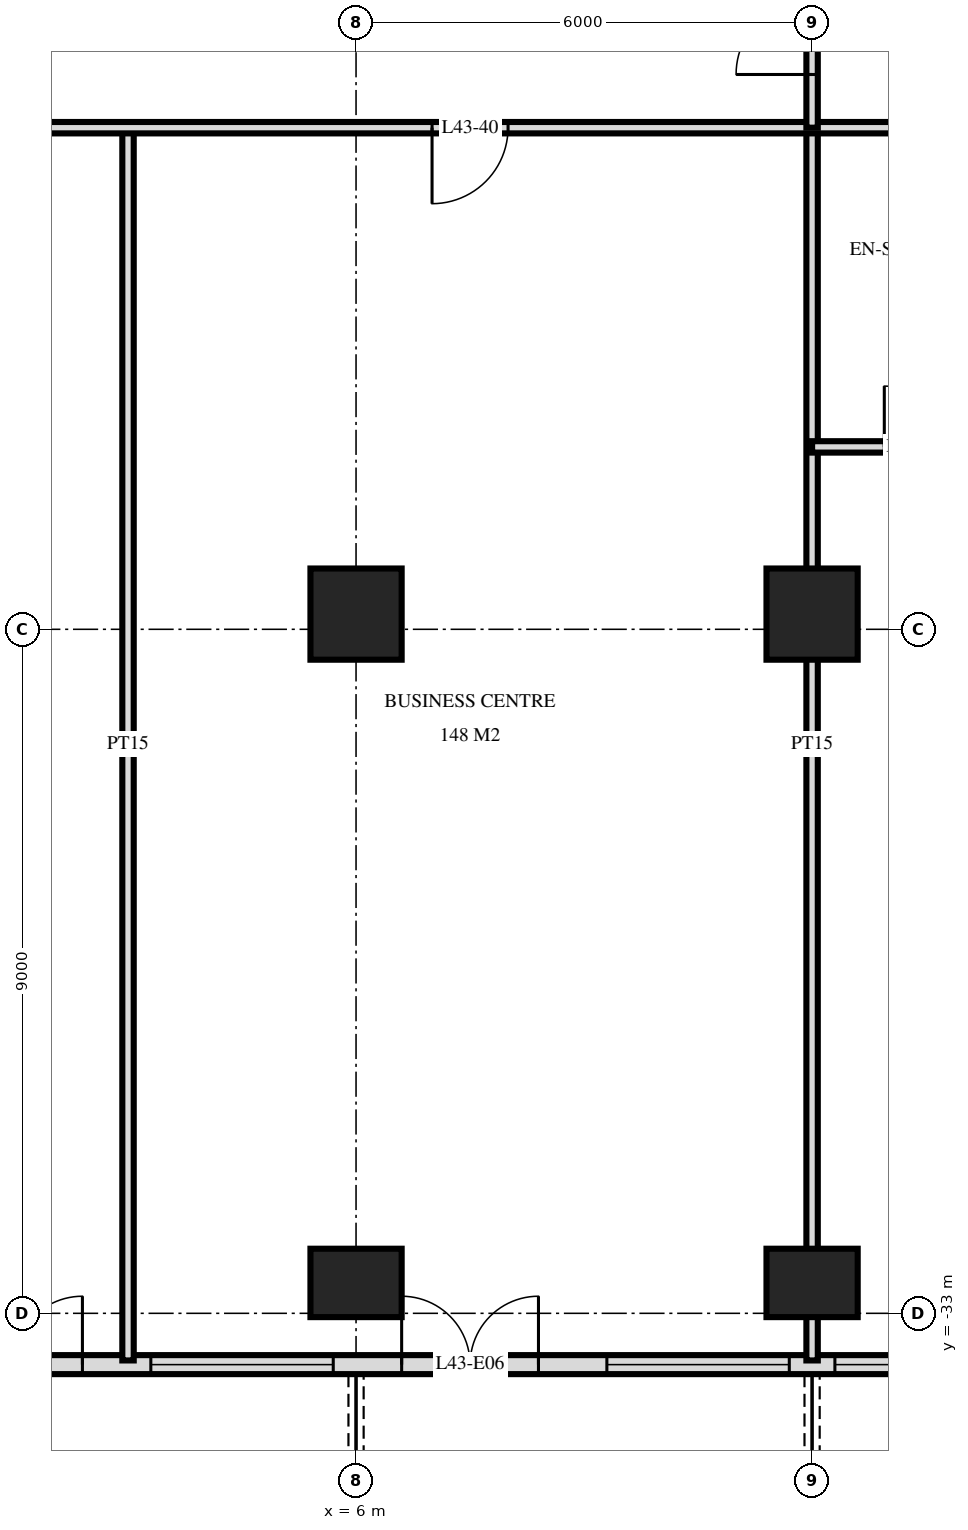
"""IFC4 building model, lengths in metres.
Left out: names, types, materials, properties, quantities, classifications, styles, units other than length and angle.
Written with IfcOpenShell. Run it as: python <this file> out.ifc"""

import sys

from ifc_helpers import new_model, si_unit, direction, frame, frame_2d, origin, origin_2d, place, context, subcontext, project, spatial, rectangle, extrude, element, fill, save


model = new_model("IFC4")
c1 = context("Model", 3, precision=1e-05, world=origin(), true_north=direction((0.0, 1.0)))
c2 = subcontext(c1, "Body", "Model", "MODEL_VIEW")
j1 = project(units=[si_unit("LENGTHUNIT", "METRE"), si_unit("PLANEANGLEUNIT", "RADIAN")], contexts=[c1])
p1 = place(None, origin())
s1 = spatial("IfcSite", under=j1, at=p1, CompositionType="ELEMENT")
p2 = place(p1, origin())
s2 = spatial("IfcBuilding", under=s1, at=p2, CompositionType="ELEMENT")
p3 = place(p2, frame((0.0, 0.0, 166.8)))
s3 = spatial("IfcBuildingStorey", under=s2, at=p3, CompositionType="ELEMENT", Elevation=166.8)
p4 = place(p3, frame((6.0, -32.6, 0.0), z_axis=(0.0, 0.0, 1.0), x_axis=(1.0, 0.0, 0.0)))
e1 = element("IfcColumn", 1, at=p4, inside=s3, PredefinedType="COLUMN", context=c2, shape_type="SweptSolid", body=[
    extrude(rectangle(XDim=1.2, YDim=0.9, at=origin_2d()), origin(), (0.0, 0.0, 1.0), 3.6),
])
p5 = place(p3, frame((6.0, -23.8, 0.0), z_axis=(0.0, 0.0, 1.0), x_axis=(1.0, 0.0, 0.0)))
e2 = element("IfcColumn", 2, at=p5, inside=s3, PredefinedType="COLUMN", context=c2, shape_type="SweptSolid", body=[
    extrude(rectangle(XDim=1.2, YDim=1.2, at=origin_2d()), origin(), (0.0, 0.0, 1.0), 3.6),
])
p6 = place(p3, frame((12.0, -32.6, 0.0), z_axis=(0.0, 0.0, 1.0), x_axis=(1.0, 0.0, 0.0)))
e3 = element("IfcColumn", 3, at=p6, inside=s3, PredefinedType="COLUMN", context=c2, shape_type="SweptSolid", body=[
    extrude(rectangle(XDim=1.2, YDim=0.9, at=origin_2d()), origin(), (0.0, 0.0, 1.0), 3.6),
])
p7 = place(p3, frame((12.0, -23.8, 0.0), z_axis=(0.0, 0.0, 1.0), x_axis=(1.0, 0.0, 0.0)))
e4 = element("IfcColumn", 4, at=p7, inside=s3, PredefinedType="COLUMN", context=c2, shape_type="SweptSolid", body=[
    extrude(rectangle(XDim=1.2, YDim=1.2, at=origin_2d()), origin(), (0.0, 0.0, 1.0), 3.6),
])
p8 = place(p3, frame((-23.675, -33.675, 0.0), z_axis=(0.0, 0.0, 1.0), x_axis=(1.0, 0.0, 0.0)))
e5 = element("IfcWall", 5, at=p8, inside=s3, PredefinedType="SOLIDWALL", context=c2, shape_type="SweptSolid", body=[
    extrude(rectangle(XDim=47.351, YDim=0.25, at=frame_2d((23.675, 0.0))), origin(), (0.0, 0.0, 1.0), 3.32),
])
p9 = place(p8, frame((0.575, 0.0, 0.0)))
e6 = element("IfcOpeningElement", 6, at=p9, cuts=e5, PredefinedType="OPENING", context=c2, shape_type="SweptSolid", body=[
    extrude(rectangle(XDim=1.8, YDim=2.4, at=frame_2d((0.9, 1.2))), frame((0.0, 0.135, 0.0), z_axis=(0.0, -1.0, 0.0), x_axis=(1.0, 0.0, 0.0)), (0.0, 0.0, 1.0), 0.27),
])
p10 = place(p8, frame((3.425, 0.0, 0.3)))
e7 = element("IfcOpeningElement", 7, at=p10, cuts=e5, PredefinedType="OPENING", context=c2, shape_type="SweptSolid", body=[
    extrude(rectangle(XDim=1.8, YDim=2.1, at=frame_2d((0.9, 1.05))), frame((0.0, 0.135, 0.0), z_axis=(0.0, -1.0, 0.0), x_axis=(1.0, 0.0, 0.0)), (0.0, 0.0, 1.0), 0.27),
])
p11 = place(p8, frame((5.975, 0.0, 0.3)))
e8 = element("IfcOpeningElement", 8, at=p11, cuts=e5, PredefinedType="OPENING", context=c2, shape_type="SweptSolid", body=[
    extrude(rectangle(XDim=2.4, YDim=2.1, at=frame_2d((1.2, 1.05))), frame((0.0, 0.135, 0.0), z_axis=(0.0, -1.0, 0.0), x_axis=(1.0, 0.0, 0.0)), (0.0, 0.0, 1.0), 0.27),
])
p12 = place(p8, frame((9.275, 0.0, 0.0)))
e9 = element("IfcOpeningElement", 9, at=p12, cuts=e5, PredefinedType="OPENING", context=c2, shape_type="SweptSolid", body=[
    extrude(rectangle(XDim=1.8, YDim=2.4, at=frame_2d((0.9, 1.2))), frame((0.0, 0.135, 0.0), z_axis=(0.0, -1.0, 0.0), x_axis=(1.0, 0.0, 0.0)), (0.0, 0.0, 1.0), 0.27),
])
p13 = place(p8, frame((12.275, 0.0, 0.0)))
e10 = element("IfcOpeningElement", 10, at=p13, cuts=e5, PredefinedType="OPENING", context=c2, shape_type="SweptSolid", body=[
    extrude(rectangle(XDim=1.8, YDim=2.4, at=frame_2d((0.9, 1.2))), frame((0.0, 0.135, 0.0), z_axis=(0.0, -1.0, 0.0), x_axis=(1.0, 0.0, 0.0)), (0.0, 0.0, 1.0), 0.27),
])
p14 = place(p8, frame((14.975, 0.0, 0.3)))
e11 = element("IfcOpeningElement", 11, at=p14, cuts=e5, PredefinedType="OPENING", context=c2, shape_type="SweptSolid", body=[
    extrude(rectangle(XDim=2.4, YDim=2.1, at=frame_2d((1.2, 1.05))), frame((0.0, 0.135, 0.0), z_axis=(0.0, -1.0, 0.0), x_axis=(1.0, 0.0, 0.0)), (0.0, 0.0, 1.0), 0.27),
])
p15 = place(p8, frame((17.975, 0.0, 0.3)))
e12 = element("IfcOpeningElement", 12, at=p15, cuts=e5, PredefinedType="OPENING", context=c2, shape_type="SweptSolid", body=[
    extrude(rectangle(XDim=2.4, YDim=2.1, at=frame_2d((1.2, 1.05))), frame((0.0, 0.135, 0.0), z_axis=(0.0, -1.0, 0.0), x_axis=(1.0, 0.0, 0.0)), (0.0, 0.0, 1.0), 0.27),
])
p16 = place(p8, frame((21.275, 0.0, 0.0)))
e13 = element("IfcOpeningElement", 13, at=p16, cuts=e5, PredefinedType="OPENING", context=c2, shape_type="SweptSolid", body=[
    extrude(rectangle(XDim=1.8, YDim=2.4, at=frame_2d((0.9, 1.2))), frame((0.0, 0.135, 0.0), z_axis=(0.0, -1.0, 0.0), x_axis=(1.0, 0.0, 0.0)), (0.0, 0.0, 1.0), 0.27),
])
p17 = place(p8, frame((24.275, 0.0, 0.0)))
e14 = element("IfcOpeningElement", 14, at=p17, cuts=e5, PredefinedType="OPENING", context=c2, shape_type="SweptSolid", body=[
    extrude(rectangle(XDim=1.8, YDim=2.4, at=frame_2d((0.9, 1.2))), frame((0.0, 0.135, 0.0), z_axis=(0.0, -1.0, 0.0), x_axis=(1.0, 0.0, 0.0)), (0.0, 0.0, 1.0), 0.27),
])
p18 = place(p8, frame((26.975, 0.0, 0.3)))
e15 = element("IfcOpeningElement", 15, at=p18, cuts=e5, PredefinedType="OPENING", context=c2, shape_type="SweptSolid", body=[
    extrude(rectangle(XDim=2.4, YDim=2.1, at=frame_2d((1.2, 1.05))), frame((0.0, 0.135, 0.0), z_axis=(0.0, -1.0, 0.0), x_axis=(1.0, 0.0, 0.0)), (0.0, 0.0, 1.0), 0.27),
])
p19 = place(p8, frame((30.275, 0.0, 0.0)))
e16 = element("IfcOpeningElement", 16, at=p19, cuts=e5, PredefinedType="OPENING", context=c2, shape_type="SweptSolid", body=[
    extrude(rectangle(XDim=1.8, YDim=2.4, at=frame_2d((0.9, 1.2))), frame((0.0, 0.135, 0.0), z_axis=(0.0, -1.0, 0.0), x_axis=(1.0, 0.0, 0.0)), (0.0, 0.0, 1.0), 0.27),
])
p20 = place(p8, frame((32.975, 0.0, 0.3)))
e17 = element("IfcOpeningElement", 17, at=p20, cuts=e5, PredefinedType="OPENING", context=c2, shape_type="SweptSolid", body=[
    extrude(rectangle(XDim=2.4, YDim=2.1, at=frame_2d((1.2, 1.05))), frame((0.0, 0.135, 0.0), z_axis=(0.0, -1.0, 0.0), x_axis=(1.0, 0.0, 0.0)), (0.0, 0.0, 1.0), 0.27),
])
p21 = place(p8, frame((35.975, 0.0, 0.3)))
e18 = element("IfcOpeningElement", 18, at=p21, cuts=e5, PredefinedType="OPENING", context=c2, shape_type="SweptSolid", body=[
    extrude(rectangle(XDim=2.4, YDim=2.1, at=frame_2d((1.2, 1.05))), frame((0.0, 0.135, 0.0), z_axis=(0.0, -1.0, 0.0), x_axis=(1.0, 0.0, 0.0)), (0.0, 0.0, 1.0), 0.27),
])
p22 = place(p8, frame((39.275, 0.0, 0.0)))
e19 = element("IfcOpeningElement", 19, at=p22, cuts=e5, PredefinedType="OPENING", context=c2, shape_type="SweptSolid", body=[
    extrude(rectangle(XDim=1.8, YDim=2.4, at=frame_2d((0.9, 1.2))), frame((0.0, 0.135, 0.0), z_axis=(0.0, -1.0, 0.0), x_axis=(1.0, 0.0, 0.0)), (0.0, 0.0, 1.0), 0.27),
])
p23 = place(p8, frame((42.275, 0.0, 0.0)))
e20 = element("IfcOpeningElement", 20, at=p23, cuts=e5, PredefinedType="OPENING", context=c2, shape_type="SweptSolid", body=[
    extrude(rectangle(XDim=1.8, YDim=2.4, at=frame_2d((0.9, 1.2))), frame((0.0, 0.135, 0.0), z_axis=(0.0, -1.0, 0.0), x_axis=(1.0, 0.0, 0.0)), (0.0, 0.0, 1.0), 0.27),
])
p24 = place(p8, frame((45.125, 0.0, 0.3)))
e21 = element("IfcOpeningElement", 21, at=p24, cuts=e5, PredefinedType="OPENING", context=c2, shape_type="SweptSolid", body=[
    extrude(rectangle(XDim=1.8, YDim=2.1, at=frame_2d((0.9, 1.05))), frame((0.0, 0.135, 0.0), z_axis=(0.0, -1.0, 0.0), x_axis=(1.0, 0.0, 0.0)), (0.0, 0.0, 1.0), 0.27),
])
p25 = place(p3, frame((12.0, -17.4, 0.0), z_axis=(0.0, 0.0, 1.0), x_axis=(0.0, 1.0, 0.0)))
e22 = element("IfcWall", 22, at=p25, inside=s3, PredefinedType="PARTITIONING", context=c2, shape_type="SweptSolid", body=[
    extrude(rectangle(XDim=2.35, YDim=0.15, at=frame_2d((1.175, 0.0))), origin(), (0.0, 0.0, 1.0), 3.32),
])
p26 = place(p25, frame((0.7, 0.0, 0.0)))
e23 = element("IfcOpeningElement", 23, at=p26, cuts=e22, PredefinedType="OPENING", context=c2, shape_type="SweptSolid", body=[
    extrude(rectangle(XDim=1.0, YDim=2.1, at=frame_2d((0.5, 1.05))), frame((0.0, 0.085, 0.0), z_axis=(0.0, -1.0, 0.0), x_axis=(1.0, 0.0, 0.0)), (0.0, 0.0, 1.0), 0.17),
])
for number, where, z_axis, x_axis in (
    (24, (12.0, -33.62, 0.0), (0.0, 0.0, 1.0), (0.0, 1.0, 0.0)),
    (25, (3.0, -33.62, 0.0), (0.0, 0.0, 1.0), (0.0, 1.0, 0.0)),
):
    element("IfcWall", number, at=place(p3, frame(where, z_axis=z_axis, x_axis=x_axis)), inside=s3, PredefinedType="PARTITIONING", context=c2, shape_type="SweptSolid", body=[
        extrude(rectangle(XDim=16.22, YDim=0.15, at=frame_2d((8.11, 0.0))), origin(), (0.0, 0.0, 1.0), 3.32),
    ])
p27 = place(p3, frame((12.0, -21.6, 0.0), z_axis=(0.0, 0.0, 1.0), x_axis=(1.0, 0.0, 0.0)))
e26 = element("IfcWall", 26, at=p27, inside=s3, PredefinedType="PARTITIONING", context=c2, shape_type="SweptSolid", body=[
    extrude(rectangle(XDim=4.2, YDim=0.15, at=frame_2d((2.1, 0.0))), origin(), (0.0, 0.0, 1.0), 3.32),
])
p28 = place(p27, frame((0.95, 0.0, 0.0)))
e27 = element("IfcOpeningElement", 27, at=p28, cuts=e26, PredefinedType="OPENING", context=c2, shape_type="SweptSolid", body=[
    extrude(rectangle(XDim=0.8, YDim=2.1, at=frame_2d((0.4, 1.05))), frame((0.0, 0.085, 0.0), z_axis=(0.0, -1.0, 0.0), x_axis=(1.0, 0.0, 0.0)), (0.0, 0.0, 1.0), 0.17),
])
p29 = place(p3, frame((-28.02, -17.4, 0.0), z_axis=(0.0, 0.0, 1.0), x_axis=(1.0, 0.0, 0.0)))
e28 = element("IfcWall", 28, at=p29, inside=s3, PredefinedType="PARTITIONING", context=c2, shape_type="SweptSolid", body=[
    extrude(rectangle(XDim=56.04, YDim=0.15, at=frame_2d((28.02, 0.0))), origin(), (0.0, 0.0, 1.0), 3.32),
])
p30 = place(p29, frame((10.42, 0.0, 0.0)))
e29 = element("IfcOpeningElement", 29, at=p30, cuts=e28, PredefinedType="OPENING", context=c2, shape_type="SweptSolid", body=[
    extrude(rectangle(XDim=1.0, YDim=2.1, at=frame_2d((0.5, 1.05))), frame((0.0, 0.085, 0.0), z_axis=(0.0, -1.0, 0.0), x_axis=(1.0, 0.0, 0.0)), (0.0, 0.0, 1.0), 0.17),
])
p31 = place(p29, frame((2.32, 0.0, 0.0)))
e30 = element("IfcOpeningElement", 30, at=p31, cuts=e28, PredefinedType="OPENING", context=c2, shape_type="SweptSolid", body=[
    extrude(rectangle(XDim=1.0, YDim=2.1, at=frame_2d((0.5, 1.05))), frame((0.0, 0.085, 0.0), z_axis=(0.0, -1.0, 0.0), x_axis=(1.0, 0.0, 0.0)), (0.0, 0.0, 1.0), 0.17),
])
p32 = place(p29, frame((49.72, 0.0, 0.0)))
e31 = element("IfcOpeningElement", 31, at=p32, cuts=e28, PredefinedType="OPENING", context=c2, shape_type="SweptSolid", body=[
    extrude(rectangle(XDim=1.0, YDim=2.1, at=frame_2d((0.5, 1.05))), frame((0.0, 0.085, 0.0), z_axis=(0.0, -1.0, 0.0), x_axis=(1.0, 0.0, 0.0)), (0.0, 0.0, 1.0), 0.17),
])
p33 = place(p29, frame((23.02, 0.0, 0.0)))
e32 = element("IfcOpeningElement", 32, at=p33, cuts=e28, PredefinedType="OPENING", context=c2, shape_type="SweptSolid", body=[
    extrude(rectangle(XDim=1.0, YDim=2.1, at=frame_2d((0.5, 1.05))), frame((0.0, 0.085, 0.0), z_axis=(0.0, -1.0, 0.0), x_axis=(1.0, 0.0, 0.0)), (0.0, 0.0, 1.0), 0.17),
])
p34 = place(p29, frame((35.02, 0.0, 0.0)))
e33 = element("IfcOpeningElement", 33, at=p34, cuts=e28, PredefinedType="OPENING", context=c2, shape_type="SweptSolid", body=[
    extrude(rectangle(XDim=1.0, YDim=2.1, at=frame_2d((0.5, 1.05))), frame((0.0, 0.085, 0.0), z_axis=(0.0, -1.0, 0.0), x_axis=(1.0, 0.0, 0.0)), (0.0, 0.0, 1.0), 0.17),
])
p35 = place(p17, origin())
e34 = element("IfcDoor", 34, at=p35, inside=s3, OperationType="DOUBLE_DOOR_SINGLE_SWING", PredefinedType="DOOR", context=c2, shape_type="SweptSolid", body=[
    extrude(rectangle(XDim=1.8, YDim=2.4, at=frame_2d((0.9, 1.2))), frame((0.0, 0.025, 0.0), z_axis=(0.0, -1.0, 0.0), x_axis=(1.0, 0.0, 0.0)), (0.0, 0.0, 1.0), 0.05),
])
fill(e14, e34)
p36 = place(p18, origin())
e35 = element("IfcWindow", 35, at=p36, inside=s3, PartitioningType="SINGLE_PANEL", PredefinedType="WINDOW", context=c2, shape_type="SweptSolid", body=[
    extrude(rectangle(XDim=2.4, YDim=2.1, at=frame_2d((1.2, 1.05))), frame((0.0, 0.03, 0.0), z_axis=(0.0, -1.0, 0.0), x_axis=(1.0, 0.0, 0.0)), (0.0, 0.0, 1.0), 0.06),
])
fill(e15, e35)
p37 = place(p19, origin())
e36 = element("IfcDoor", 36, at=p37, inside=s3, OperationType="DOUBLE_DOOR_SINGLE_SWING", PredefinedType="DOOR", context=c2, shape_type="SweptSolid", body=[
    extrude(rectangle(XDim=1.8, YDim=2.4, at=frame_2d((0.9, 1.2))), frame((0.0, 0.025, 0.0), z_axis=(0.0, -1.0, 0.0), x_axis=(1.0, 0.0, 0.0)), (0.0, 0.0, 1.0), 0.05),
])
fill(e16, e36)
p38 = place(p20, origin())
e37 = element("IfcWindow", 37, at=p38, inside=s3, PartitioningType="SINGLE_PANEL", PredefinedType="WINDOW", context=c2, shape_type="SweptSolid", body=[
    extrude(rectangle(XDim=2.4, YDim=2.1, at=frame_2d((1.2, 1.05))), frame((0.0, 0.03, 0.0), z_axis=(0.0, -1.0, 0.0), x_axis=(1.0, 0.0, 0.0)), (0.0, 0.0, 1.0), 0.06),
])
fill(e17, e37)
p39 = place(p21, origin())
e38 = element("IfcWindow", 38, at=p39, inside=s3, PartitioningType="SINGLE_PANEL", PredefinedType="WINDOW", context=c2, shape_type="SweptSolid", body=[
    extrude(rectangle(XDim=2.4, YDim=2.1, at=frame_2d((1.2, 1.05))), frame((0.0, 0.03, 0.0), z_axis=(0.0, -1.0, 0.0), x_axis=(1.0, 0.0, 0.0)), (0.0, 0.0, 1.0), 0.06),
])
fill(e18, e38)
p40 = place(p26, origin())
e39 = element("IfcDoor", 39, at=p40, inside=s3, OperationType="SINGLE_SWING_RIGHT", PredefinedType="DOOR", context=c2, shape_type="SweptSolid", body=[
    extrude(rectangle(XDim=1.0, YDim=2.1, at=frame_2d((0.5, 1.05))), frame((0.0, 0.025, 0.0), z_axis=(0.0, -1.0, 0.0), x_axis=(1.0, 0.0, 0.0)), (0.0, 0.0, 1.0), 0.05),
])
fill(e23, e39)
p41 = place(p34, frame((0.5, 0.0, 0.0), z_axis=(0.0, 0.0, 1.0), x_axis=(-1.0, 0.0, 0.0)))
e40 = element("IfcDoor", 40, at=p41, inside=s3, OperationType="SINGLE_SWING_LEFT", PredefinedType="DOOR", context=c2, shape_type="SweptSolid", body=[
    extrude(rectangle(XDim=1.0, YDim=2.1, at=frame_2d((0.0, 1.05))), frame((0.0, -0.025, 0.0), z_axis=(0.0, 1.0, 0.0), x_axis=(-1.0, 0.0, 0.0)), (0.0, 0.0, 1.0), 0.05),
])
fill(e33, e40)
p42 = place(p28, origin())
e41 = element("IfcDoor", 41, at=p42, inside=s3, OperationType="SINGLE_SWING_RIGHT", PredefinedType="DOOR", context=c2, shape_type="SweptSolid", body=[
    extrude(rectangle(XDim=0.8, YDim=2.1, at=frame_2d((0.4, 1.05))), frame((0.0, 0.025, 0.0), z_axis=(0.0, -1.0, 0.0), x_axis=(1.0, 0.0, 0.0)), (0.0, 0.0, 1.0), 0.05),
])
fill(e27, e41)
save(model, sys.argv[1])
